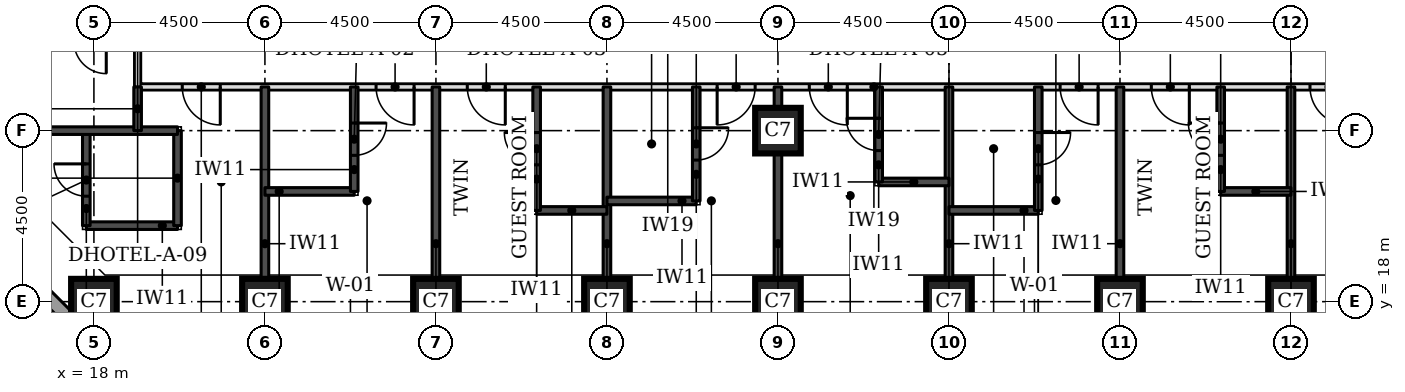
"""IFC4 building model, lengths in metres.
Left out: names, types, materials, properties, quantities, classifications, styles, units other than length and angle.
Written with IfcOpenShell. Run it as: python <this file> out.ifc"""

import sys

from ifc_helpers import new_model, si_unit, direction, frame, frame_2d, origin, origin_2d, place, context, subcontext, project, spatial, rectangle, extrude, element, fill, save


model = new_model("IFC4")
c1 = context("Model", 3, precision=1e-05, world=origin(), true_north=direction((0.0, 1.0)))
c2 = subcontext(c1, "Body", "Model", "MODEL_VIEW")
j1 = project(units=[si_unit("LENGTHUNIT", "METRE"), si_unit("PLANEANGLEUNIT", "RADIAN")], contexts=[c1])
p1 = place(None, origin())
s1 = spatial("IfcSite", under=j1, at=p1, CompositionType="ELEMENT")
p2 = place(p1, origin())
s2 = spatial("IfcBuilding", under=s1, at=p2, CompositionType="ELEMENT")
p3 = place(p2, frame((0.0, 0.0, 49.5)))
s3 = spatial("IfcBuildingStorey", under=s2, at=p3, CompositionType="ELEMENT", Elevation=49.5)
for number, where, z_axis, x_axis in (
    (1, (18.0, 18.0, 0.0), (0.0, 0.0, 1.0), (1.0, 0.0, 0.0)),
    (2, (22.5, 18.0, 0.0), (0.0, 0.0, 1.0), (1.0, 0.0, 0.0)),
    (3, (27.0, 18.0, 0.0), (0.0, 0.0, 1.0), (1.0, 0.0, 0.0)),
    (4, (31.5, 18.0, 0.0), (0.0, 0.0, 1.0), (1.0, 0.0, 0.0)),
    (5, (36.0, 18.0, 0.0), (0.0, 0.0, 1.0), (1.0, 0.0, 0.0)),
    (6, (40.5, 18.0, 0.0), (0.0, 0.0, 1.0), (1.0, 0.0, 0.0)),
    (7, (45.0, 18.0, 0.0), (0.0, 0.0, 1.0), (1.0, 0.0, 0.0)),
    (8, (49.5, 18.0, 0.0), (0.0, 0.0, 1.0), (1.0, 0.0, 0.0)),
    (9, (36.0, 22.5, 0.0), (0.0, 0.0, 1.0), (1.0, 0.0, 0.0)),
):
    element("IfcColumn", number, at=place(p3, frame(where, z_axis=z_axis, x_axis=x_axis)), inside=s3, PredefinedType="COLUMN", context=c2, shape_type="SweptSolid", body=[
        extrude(rectangle(XDim=1.2, YDim=1.2, at=origin_2d()), origin(), (0.0, 0.0, 1.0), 3.3),
    ])
p4 = place(p3, frame((12.674, 22.23, 0.0), z_axis=(0.0, 0.0, 1.0), x_axis=(0.707106781187, -0.707106781187, 0.0)))
e10 = element("IfcWall", 10, at=p4, inside=s3, PredefinedType="STANDARD", context=c2, shape_type="SweptSolid", body=[
    extrude(rectangle(XDim=7.151, YDim=0.35, at=frame_2d((3.576, 0.0))), origin(), (0.0, 0.0, 1.0), 3.055),
])
p5 = place(p4, frame((1.926, 0.0, 0.8)))
e11 = element("IfcOpeningElement", 11, at=p5, cuts=e10, PredefinedType="OPENING", context=c2, shape_type="SweptSolid", body=[
    extrude(rectangle(XDim=3.3, YDim=1.5, at=frame_2d((1.65, 0.75))), frame((0.0, 0.185, 0.0), z_axis=(0.0, -1.0, 0.0), x_axis=(1.0, 0.0, 0.0)), (0.0, 0.0, 1.0), 0.37),
])
p6 = place(p3, frame((19.15, 23.65, 0.0), z_axis=(0.0, 0.0, 1.0), x_axis=(1.0, 0.0, 0.0)))
e12 = element("IfcWall", 12, at=p6, inside=s3, PredefinedType="PARTITIONING", context=c2, shape_type="SweptSolid", body=[
    extrude(rectangle(XDim=32.35, YDim=0.15, at=frame_2d((16.175, 0.0))), origin(), (0.0, 0.0, 1.0), 3.08),
])
p7 = place(p6, frame((6.275, 0.0, 0.0)))
e13 = element("IfcOpeningElement", 13, at=p7, cuts=e12, PredefinedType="OPENING", context=c2, shape_type="SweptSolid", body=[
    extrude(rectangle(XDim=1.0, YDim=2.1, at=frame_2d((0.5, 1.05))), frame((0.0, 0.085, 0.0), z_axis=(0.0, -1.0, 0.0), x_axis=(1.0, 0.0, 0.0)), (0.0, 0.0, 1.0), 0.17),
])
p8 = place(p6, frame((8.675, 0.0, 0.0)))
e14 = element("IfcOpeningElement", 14, at=p8, cuts=e12, PredefinedType="OPENING", context=c2, shape_type="SweptSolid", body=[
    extrude(rectangle(XDim=1.0, YDim=2.1, at=frame_2d((0.5, 1.05))), frame((0.0, 0.085, 0.0), z_axis=(0.0, -1.0, 0.0), x_axis=(1.0, 0.0, 0.0)), (0.0, 0.0, 1.0), 0.17),
])
p9 = place(p6, frame((15.25, 0.0, 0.0)))
e15 = element("IfcOpeningElement", 15, at=p9, cuts=e12, PredefinedType="OPENING", context=c2, shape_type="SweptSolid", body=[
    extrude(rectangle(XDim=1.0, YDim=2.1, at=frame_2d((0.5, 1.05))), frame((0.0, 0.085, 0.0), z_axis=(0.0, -1.0, 0.0), x_axis=(1.0, 0.0, 0.0)), (0.0, 0.0, 1.0), 0.17),
])
p10 = place(p6, frame((17.675, 0.0, 0.0)))
e16 = element("IfcOpeningElement", 16, at=p10, cuts=e12, PredefinedType="OPENING", context=c2, shape_type="SweptSolid", body=[
    extrude(rectangle(XDim=1.0, YDim=2.1, at=frame_2d((0.5, 1.05))), frame((0.0, 0.085, 0.0), z_axis=(0.0, -1.0, 0.0), x_axis=(1.0, 0.0, 0.0)), (0.0, 0.0, 1.0), 0.17),
])
p11 = place(p6, frame((24.275, 0.0, 0.0)))
e17 = element("IfcOpeningElement", 17, at=p11, cuts=e12, PredefinedType="OPENING", context=c2, shape_type="SweptSolid", body=[
    extrude(rectangle(XDim=1.0, YDim=2.1, at=frame_2d((0.5, 1.05))), frame((0.0, 0.085, 0.0), z_axis=(0.0, -1.0, 0.0), x_axis=(1.0, 0.0, 0.0)), (0.0, 0.0, 1.0), 0.17),
])
p12 = place(p6, frame((26.675, 0.0, 0.0)))
e18 = element("IfcOpeningElement", 18, at=p12, cuts=e12, PredefinedType="OPENING", context=c2, shape_type="SweptSolid", body=[
    extrude(rectangle(XDim=1.0, YDim=2.1, at=frame_2d((0.5, 1.05))), frame((0.0, 0.085, 0.0), z_axis=(0.0, -1.0, 0.0), x_axis=(1.0, 0.0, 0.0)), (0.0, 0.0, 1.0), 0.17),
])
p13 = place(p6, frame((1.175, 0.0, 0.0)))
e19 = element("IfcOpeningElement", 19, at=p13, cuts=e12, PredefinedType="OPENING", context=c2, shape_type="SweptSolid", body=[
    extrude(rectangle(XDim=1.0, YDim=2.1, at=frame_2d((0.5, 1.05))), frame((0.0, 0.085, 0.0), z_axis=(0.0, -1.0, 0.0), x_axis=(1.0, 0.0, 0.0)), (0.0, 0.0, 1.0), 0.17),
])
p14 = place(p6, frame((30.85, 0.0, 0.0)))
e20 = element("IfcOpeningElement", 20, at=p14, cuts=e12, PredefinedType="OPENING", context=c2, shape_type="SweptSolid", body=[
    extrude(rectangle(XDim=1.0, YDim=2.1, at=frame_2d((0.5, 1.05))), frame((0.0, 0.085, 0.0), z_axis=(0.0, -1.0, 0.0), x_axis=(1.0, 0.0, 0.0)), (0.0, 0.0, 1.0), 0.17),
])
p15 = place(p3, frame((19.15, 23.65, 0.0), z_axis=(0.0, 0.0, 1.0), x_axis=(0.0, 1.0, 0.0)))
e21 = element("IfcWall", 21, at=p15, inside=s3, PredefinedType="PARTITIONING", context=c2, shape_type="SweptSolid", body=[
    extrude(rectangle(XDim=25.85, YDim=0.15, at=frame_2d((12.925, 0.0))), origin(), (0.0, 0.0, 1.0), 3.08),
])
p16 = place(p15, frame((1.775, 0.0, 0.0)))
e22 = element("IfcOpeningElement", 22, at=p16, cuts=e21, PredefinedType="OPENING", context=c2, shape_type="SweptSolid", body=[
    extrude(rectangle(XDim=1.0, YDim=2.1, at=frame_2d((0.5, 1.05))), frame((0.0, 0.085, 0.0), z_axis=(0.0, -1.0, 0.0), x_axis=(1.0, 0.0, 0.0)), (0.0, 0.0, 1.0), 0.17),
])
p17 = place(p15, frame((6.125, 0.0, 0.0)))
e23 = element("IfcOpeningElement", 23, at=p17, cuts=e21, PredefinedType="OPENING", context=c2, shape_type="SweptSolid", body=[
    extrude(rectangle(XDim=1.0, YDim=2.1, at=frame_2d((0.5, 1.05))), frame((0.0, 0.085, 0.0), z_axis=(0.0, -1.0, 0.0), x_axis=(1.0, 0.0, 0.0)), (0.0, 0.0, 1.0), 0.17),
])
p18 = place(p15, frame((17.825, 0.0, 0.0)))
e24 = element("IfcOpeningElement", 24, at=p18, cuts=e21, PredefinedType="OPENING", context=c2, shape_type="SweptSolid", body=[
    extrude(rectangle(XDim=1.0, YDim=2.1, at=frame_2d((0.5, 1.05))), frame((0.0, 0.085, 0.0), z_axis=(0.0, -1.0, 0.0), x_axis=(1.0, 0.0, 0.0)), (0.0, 0.0, 1.0), 0.17),
])
p19 = place(p15, frame((23.04, 0.0, 0.0)))
e25 = element("IfcOpeningElement", 25, at=p19, cuts=e21, PredefinedType="OPENING", context=c2, shape_type="SweptSolid", body=[
    extrude(rectangle(XDim=0.9, YDim=2.1, at=frame_2d((0.45, 1.05))), frame((0.0, 0.085, 0.0), z_axis=(0.0, -1.0, 0.0), x_axis=(1.0, 0.0, 0.0)), (0.0, 0.0, 1.0), 0.17),
])
for number, where, z_axis, x_axis in (
    (26, (22.5, 18.6, 0.0), (0.0, 0.0, 1.0), (0.0, 1.0, 0.0)),
    (27, (27.0, 18.6, 0.0), (0.0, 0.0, 1.0), (0.0, 1.0, 0.0)),
    (28, (31.5, 18.6, 0.0), (0.0, 0.0, 1.0), (0.0, 1.0, 0.0)),
    (29, (36.0, 18.6, 0.0), (0.0, 0.0, 1.0), (0.0, 1.0, 0.0)),
    (30, (40.5, 18.6, 0.0), (0.0, 0.0, 1.0), (0.0, 1.0, 0.0)),
    (31, (45.0, 18.6, 0.0), (0.0, 0.0, 1.0), (0.0, 1.0, 0.0)),
    (32, (49.5, 18.6, 0.0), (0.0, 0.0, 1.0), (0.0, 1.0, 0.0)),
):
    element("IfcWall", number, at=place(p3, frame(where, z_axis=z_axis, x_axis=x_axis)), inside=s3, PredefinedType="SOLIDWALL", context=c2, shape_type="SweptSolid", body=[
        extrude(rectangle(XDim=5.05, YDim=0.2, at=frame_2d((2.525, 0.0))), origin(), (0.0, 0.0, 1.0), 3.08),
    ])
p20 = place(p3, frame((17.8, 20.0, 0.0), z_axis=(0.0, 0.0, 1.0), x_axis=(1.0, 0.0, 0.0)))
e33 = element("IfcWall", 33, at=p20, inside=s3, PredefinedType="SOLIDWALL", context=c2, shape_type="SweptSolid", body=[
    extrude(rectangle(XDim=2.4, YDim=0.2, at=frame_2d((1.2, 0.0))), origin(), (0.0, 0.0, 1.0), 3.08),
])
p21 = place(p3, frame((17.8, 20.0, 0.0), z_axis=(0.0, 0.0, 1.0), x_axis=(0.0, 1.0, 0.0)))
e34 = element("IfcWall", 34, at=p21, inside=s3, PredefinedType="SOLIDWALL", context=c2, shape_type="SweptSolid", body=[
    extrude(rectangle(XDim=2.5, YDim=0.2, at=frame_2d((1.25, 0.0))), origin(), (0.0, 0.0, 1.0), 3.08),
])
p22 = place(p21, frame((0.775, 0.0, 0.0)))
e35 = element("IfcOpeningElement", 35, at=p22, cuts=e34, PredefinedType="OPENING", context=c2, shape_type="SweptSolid", body=[
    extrude(rectangle(XDim=0.85, YDim=2.1, at=frame_2d((0.425, 1.05))), frame((0.0, 0.11, 0.0), z_axis=(0.0, -1.0, 0.0), x_axis=(1.0, 0.0, 0.0)), (0.0, 0.0, 1.0), 0.22),
])
p23 = place(p3, frame((20.2, 20.0, 0.0), z_axis=(0.0, 0.0, 1.0), x_axis=(0.0, 1.0, 0.0)))
e36 = element("IfcWall", 36, at=p23, inside=s3, PredefinedType="SOLIDWALL", context=c2, shape_type="SweptSolid", body=[
    extrude(rectangle(XDim=2.5, YDim=0.2, at=frame_2d((1.25, 0.0))), origin(), (0.0, 0.0, 1.0), 3.08),
])
p24 = place(p3, frame((29.65, 20.4, 0.0), z_axis=(0.0, 0.0, 1.0), x_axis=(1.0, 0.0, 0.0)))
e37 = element("IfcWall", 37, at=p24, inside=s3, PredefinedType="SOLIDWALL", context=c2, shape_type="SweptSolid", body=[
    extrude(rectangle(XDim=1.85, YDim=0.2, at=frame_2d((0.925, 0.0))), origin(), (0.0, 0.0, 1.0), 3.08),
])
p25 = place(p3, frame((29.65, 20.4, 0.0), z_axis=(0.0, 0.0, 1.0), x_axis=(0.0, 1.0, 0.0)))
e38 = element("IfcWall", 38, at=p25, inside=s3, PredefinedType="SOLIDWALL", context=c2, shape_type="SweptSolid", body=[
    extrude(rectangle(XDim=3.25, YDim=0.2, at=frame_2d((1.625, 0.0))), origin(), (0.0, 0.0, 1.0), 3.08),
])
p26 = place(p25, frame((1.2, 0.0, 0.0)))
e39 = element("IfcOpeningElement", 39, at=p26, cuts=e38, PredefinedType="OPENING", context=c2, shape_type="SweptSolid", body=[
    extrude(rectangle(XDim=0.85, YDim=2.1, at=frame_2d((0.425, 1.05))), frame((0.0, 0.11, 0.0), z_axis=(0.0, -1.0, 0.0), x_axis=(1.0, 0.0, 0.0)), (0.0, 0.0, 1.0), 0.22),
])
p27 = place(p3, frame((40.5, 20.4, 0.0), z_axis=(0.0, 0.0, 1.0), x_axis=(1.0, 0.0, 0.0)))
e40 = element("IfcWall", 40, at=p27, inside=s3, PredefinedType="SOLIDWALL", context=c2, shape_type="SweptSolid", body=[
    extrude(rectangle(XDim=2.35, YDim=0.2, at=frame_2d((1.175, 0.0))), origin(), (0.0, 0.0, 1.0), 3.08),
])
p28 = place(p3, frame((42.85, 20.4, 0.0), z_axis=(0.0, 0.0, 1.0), x_axis=(0.0, 1.0, 0.0)))
e41 = element("IfcWall", 41, at=p28, inside=s3, PredefinedType="SOLIDWALL", context=c2, shape_type="SweptSolid", body=[
    extrude(rectangle(XDim=3.25, YDim=0.2, at=frame_2d((1.625, 0.0))), origin(), (0.0, 0.0, 1.0), 3.08),
])
p29 = place(p28, frame((1.2, 0.0, 0.0)))
e42 = element("IfcOpeningElement", 42, at=p29, cuts=e41, PredefinedType="OPENING", context=c2, shape_type="SweptSolid", body=[
    extrude(rectangle(XDim=0.85, YDim=2.1, at=frame_2d((0.425, 1.05))), frame((0.0, 0.11, 0.0), z_axis=(0.0, -1.0, 0.0), x_axis=(1.0, 0.0, 0.0)), (0.0, 0.0, 1.0), 0.22),
])
p30 = place(p3, frame((31.5, 20.65, 0.0), z_axis=(0.0, 0.0, 1.0), x_axis=(1.0, 0.0, 0.0)))
e43 = element("IfcWall", 43, at=p30, inside=s3, PredefinedType="SOLIDWALL", context=c2, shape_type="SweptSolid", body=[
    extrude(rectangle(XDim=2.35, YDim=0.2, at=frame_2d((1.175, 0.0))), origin(), (0.0, 0.0, 1.0), 3.08),
])
p31 = place(p3, frame((33.85, 20.65, 0.0), z_axis=(0.0, 0.0, 1.0), x_axis=(0.0, 1.0, 0.0)))
e44 = element("IfcWall", 44, at=p31, inside=s3, PredefinedType="SOLIDWALL", context=c2, shape_type="SweptSolid", body=[
    extrude(rectangle(XDim=3.0, YDim=0.2, at=frame_2d((1.5, 0.0))), origin(), (0.0, 0.0, 1.0), 3.08),
])
p32 = place(p31, frame((1.075, 0.0, 0.0)))
e45 = element("IfcOpeningElement", 45, at=p32, cuts=e44, PredefinedType="OPENING", context=c2, shape_type="SweptSolid", body=[
    extrude(rectangle(XDim=0.85, YDim=2.1, at=frame_2d((0.425, 1.05))), frame((0.0, 0.11, 0.0), z_axis=(0.0, -1.0, 0.0), x_axis=(1.0, 0.0, 0.0)), (0.0, 0.0, 1.0), 0.22),
])
p33 = place(p3, frame((22.5, 20.9, 0.0), z_axis=(0.0, 0.0, 1.0), x_axis=(1.0, 0.0, 0.0)))
e46 = element("IfcWall", 46, at=p33, inside=s3, PredefinedType="SOLIDWALL", context=c2, shape_type="SweptSolid", body=[
    extrude(rectangle(XDim=2.35, YDim=0.2, at=frame_2d((1.175, 0.0))), origin(), (0.0, 0.0, 1.0), 3.08),
])
p34 = place(p3, frame((24.85, 20.9, 0.0), z_axis=(0.0, 0.0, 1.0), x_axis=(0.0, 1.0, 0.0)))
e47 = element("IfcWall", 47, at=p34, inside=s3, PredefinedType="SOLIDWALL", context=c2, shape_type="SweptSolid", body=[
    extrude(rectangle(XDim=2.75, YDim=0.2, at=frame_2d((1.375, 0.0))), origin(), (0.0, 0.0, 1.0), 3.08),
])
p35 = place(p34, frame((0.95, 0.0, 0.0)))
e48 = element("IfcOpeningElement", 48, at=p35, cuts=e47, PredefinedType="OPENING", context=c2, shape_type="SweptSolid", body=[
    extrude(rectangle(XDim=0.85, YDim=2.1, at=frame_2d((0.425, 1.05))), frame((0.0, 0.11, 0.0), z_axis=(0.0, -1.0, 0.0), x_axis=(1.0, 0.0, 0.0)), (0.0, 0.0, 1.0), 0.22),
])
p36 = place(p3, frame((47.65, 20.9, 0.0), z_axis=(0.0, 0.0, 1.0), x_axis=(1.0, 0.0, 0.0)))
e49 = element("IfcWall", 49, at=p36, inside=s3, PredefinedType="SOLIDWALL", context=c2, shape_type="SweptSolid", body=[
    extrude(rectangle(XDim=1.85, YDim=0.2, at=frame_2d((0.925, 0.0))), origin(), (0.0, 0.0, 1.0), 3.08),
])
p37 = place(p3, frame((47.65, 20.9, 0.0), z_axis=(0.0, 0.0, 1.0), x_axis=(0.0, 1.0, 0.0)))
e50 = element("IfcWall", 50, at=p37, inside=s3, PredefinedType="SOLIDWALL", context=c2, shape_type="SweptSolid", body=[
    extrude(rectangle(XDim=2.75, YDim=0.2, at=frame_2d((1.375, 0.0))), origin(), (0.0, 0.0, 1.0), 3.08),
])
p38 = place(p37, frame((0.95, 0.0, 0.0)))
e51 = element("IfcOpeningElement", 51, at=p38, cuts=e50, PredefinedType="OPENING", context=c2, shape_type="SweptSolid", body=[
    extrude(rectangle(XDim=0.85, YDim=2.1, at=frame_2d((0.425, 1.05))), frame((0.0, 0.11, 0.0), z_axis=(0.0, -1.0, 0.0), x_axis=(1.0, 0.0, 0.0)), (0.0, 0.0, 1.0), 0.22),
])
p39 = place(p3, frame((38.65, 21.15, 0.0), z_axis=(0.0, 0.0, 1.0), x_axis=(1.0, 0.0, 0.0)))
e52 = element("IfcWall", 52, at=p39, inside=s3, PredefinedType="SOLIDWALL", context=c2, shape_type="SweptSolid", body=[
    extrude(rectangle(XDim=1.85, YDim=0.2, at=frame_2d((0.925, 0.0))), origin(), (0.0, 0.0, 1.0), 3.08),
])
p40 = place(p3, frame((38.65, 21.15, 0.0), z_axis=(0.0, 0.0, 1.0), x_axis=(0.0, 1.0, 0.0)))
e53 = element("IfcWall", 53, at=p40, inside=s3, PredefinedType="SOLIDWALL", context=c2, shape_type="SweptSolid", body=[
    extrude(rectangle(XDim=2.5, YDim=0.2, at=frame_2d((1.25, 0.0))), origin(), (0.0, 0.0, 1.0), 3.08),
])
p41 = place(p40, frame((0.825, 0.0, 0.0)))
e54 = element("IfcOpeningElement", 54, at=p41, cuts=e53, PredefinedType="OPENING", context=c2, shape_type="SweptSolid", body=[
    extrude(rectangle(XDim=0.85, YDim=2.1, at=frame_2d((0.425, 1.05))), frame((0.0, 0.11, 0.0), z_axis=(0.0, -1.0, 0.0), x_axis=(1.0, 0.0, 0.0)), (0.0, 0.0, 1.0), 0.22),
])
p42 = place(p3, frame((14.1, 22.5, 0.0), z_axis=(0.0, 0.0, 1.0), x_axis=(1.0, 0.0, 0.0)))
e55 = element("IfcWall", 55, at=p42, inside=s3, PredefinedType="SOLIDWALL", context=c2, shape_type="SweptSolid", body=[
    extrude(rectangle(XDim=6.1, YDim=0.2, at=frame_2d((3.05, 0.0))), origin(), (0.0, 0.0, 1.0), 3.08),
])
p43 = place(p3, frame((19.15, 22.5, 0.0), z_axis=(0.0, 0.0, 1.0), x_axis=(0.0, 1.0, 0.0)))
e56 = element("IfcWall", 56, at=p43, inside=s3, PredefinedType="SOLIDWALL", context=c2, shape_type="SweptSolid", body=[
    extrude(rectangle(XDim=1.15, YDim=0.2, at=frame_2d((0.575, 0.0))), origin(), (0.0, 0.0, 1.0), 3.08),
])
p44 = place(p7, frame((1.0, 0.0, 0.0), z_axis=(0.0, 0.0, 1.0), x_axis=(-1.0, 0.0, 0.0)))
e57 = element("IfcDoor", 57, at=p44, inside=s3, OperationType="SINGLE_SWING_LEFT", PredefinedType="DOOR", context=c2, shape_type="SweptSolid", body=[
    extrude(rectangle(XDim=1.0, YDim=2.1, at=frame_2d((0.5, 1.05))), frame((0.0, 0.025, 0.0), z_axis=(0.0, -1.0, 0.0), x_axis=(1.0, 0.0, 0.0)), (0.0, 0.0, 1.0), 0.05),
])
fill(e13, e57)
p45 = place(p35, frame((0.85, 0.0, 0.0), z_axis=(0.0, 0.0, 1.0), x_axis=(-1.0, 0.0, 0.0)))
e58 = element("IfcDoor", 58, at=p45, inside=s3, OperationType="SINGLE_SWING_LEFT", PredefinedType="DOOR", context=c2, shape_type="SweptSolid", body=[
    extrude(rectangle(XDim=0.85, YDim=2.1, at=frame_2d((0.425, 1.05))), frame((0.0, 0.025, 0.0), z_axis=(0.0, -1.0, 0.0), x_axis=(1.0, 0.0, 0.0)), (0.0, 0.0, 1.0), 0.05),
])
fill(e48, e58)
p46 = place(p8, frame((1.0, 0.0, 0.0), z_axis=(0.0, 0.0, 1.0), x_axis=(-1.0, 0.0, 0.0)))
e59 = element("IfcDoor", 59, at=p46, inside=s3, OperationType="SINGLE_SWING_LEFT", PredefinedType="DOOR", context=c2, shape_type="SweptSolid", body=[
    extrude(rectangle(XDim=1.0, YDim=2.1, at=frame_2d((0.5, 1.05))), frame((0.0, 0.025, 0.0), z_axis=(0.0, -1.0, 0.0), x_axis=(1.0, 0.0, 0.0)), (0.0, 0.0, 1.0), 0.05),
])
fill(e14, e59)
p47 = place(p26, origin())
e60 = element("IfcDoor", 60, at=p47, inside=s3, OperationType="SINGLE_SWING_RIGHT", PredefinedType="DOOR", context=c2, shape_type="SweptSolid", body=[
    extrude(rectangle(XDim=0.85, YDim=2.1, at=frame_2d((0.425, 1.05))), frame((0.0, 0.025, 0.0), z_axis=(0.0, -1.0, 0.0), x_axis=(1.0, 0.0, 0.0)), (0.0, 0.0, 1.0), 0.05),
])
fill(e39, e60)
p48 = place(p9, frame((1.0, 0.0, 0.0), z_axis=(0.0, 0.0, 1.0), x_axis=(-1.0, 0.0, 0.0)))
e61 = element("IfcDoor", 61, at=p48, inside=s3, OperationType="SINGLE_SWING_RIGHT", PredefinedType="DOOR", context=c2, shape_type="SweptSolid", body=[
    extrude(rectangle(XDim=1.0, YDim=2.1, at=frame_2d((0.5, 1.05))), frame((0.0, 0.025, 0.0), z_axis=(0.0, -1.0, 0.0), x_axis=(1.0, 0.0, 0.0)), (0.0, 0.0, 1.0), 0.05),
])
fill(e15, e61)
p49 = place(p32, frame((0.85, 0.0, 0.0), z_axis=(0.0, 0.0, 1.0), x_axis=(-1.0, 0.0, 0.0)))
e62 = element("IfcDoor", 62, at=p49, inside=s3, OperationType="SINGLE_SWING_LEFT", PredefinedType="DOOR", context=c2, shape_type="SweptSolid", body=[
    extrude(rectangle(XDim=0.85, YDim=2.1, at=frame_2d((0.425, 1.05))), frame((0.0, 0.025, 0.0), z_axis=(0.0, -1.0, 0.0), x_axis=(1.0, 0.0, 0.0)), (0.0, 0.0, 1.0), 0.05),
])
fill(e45, e62)
p50 = place(p10, frame((1.0, 0.0, 0.0), z_axis=(0.0, 0.0, 1.0), x_axis=(-1.0, 0.0, 0.0)))
e63 = element("IfcDoor", 63, at=p50, inside=s3, OperationType="SINGLE_SWING_LEFT", PredefinedType="DOOR", context=c2, shape_type="SweptSolid", body=[
    extrude(rectangle(XDim=1.0, YDim=2.1, at=frame_2d((0.5, 1.05))), frame((0.0, 0.025, 0.0), z_axis=(0.0, -1.0, 0.0), x_axis=(1.0, 0.0, 0.0)), (0.0, 0.0, 1.0), 0.05),
])
fill(e16, e63)
p51 = place(p41, origin())
e64 = element("IfcDoor", 64, at=p51, inside=s3, OperationType="SINGLE_SWING_RIGHT", PredefinedType="DOOR", context=c2, shape_type="SweptSolid", body=[
    extrude(rectangle(XDim=0.85, YDim=2.1, at=frame_2d((0.425, 1.05))), frame((0.0, 0.025, 0.0), z_axis=(0.0, -1.0, 0.0), x_axis=(1.0, 0.0, 0.0)), (0.0, 0.0, 1.0), 0.05),
])
fill(e54, e64)
p52 = place(p11, frame((1.0, 0.0, 0.0), z_axis=(0.0, 0.0, 1.0), x_axis=(-1.0, 0.0, 0.0)))
e65 = element("IfcDoor", 65, at=p52, inside=s3, OperationType="SINGLE_SWING_LEFT", PredefinedType="DOOR", context=c2, shape_type="SweptSolid", body=[
    extrude(rectangle(XDim=1.0, YDim=2.1, at=frame_2d((0.5, 1.05))), frame((0.0, 0.025, 0.0), z_axis=(0.0, -1.0, 0.0), x_axis=(1.0, 0.0, 0.0)), (0.0, 0.0, 1.0), 0.05),
])
fill(e17, e65)
p53 = place(p29, frame((0.85, 0.0, 0.0), z_axis=(0.0, 0.0, 1.0), x_axis=(-1.0, 0.0, 0.0)))
e66 = element("IfcDoor", 66, at=p53, inside=s3, OperationType="SINGLE_SWING_LEFT", PredefinedType="DOOR", context=c2, shape_type="SweptSolid", body=[
    extrude(rectangle(XDim=0.85, YDim=2.1, at=frame_2d((0.425, 1.05))), frame((0.0, 0.025, 0.0), z_axis=(0.0, -1.0, 0.0), x_axis=(1.0, 0.0, 0.0)), (0.0, 0.0, 1.0), 0.05),
])
fill(e42, e66)
p54 = place(p12, frame((1.0, 0.0, 0.0), z_axis=(0.0, 0.0, 1.0), x_axis=(-1.0, 0.0, 0.0)))
e67 = element("IfcDoor", 67, at=p54, inside=s3, OperationType="SINGLE_SWING_LEFT", PredefinedType="DOOR", context=c2, shape_type="SweptSolid", body=[
    extrude(rectangle(XDim=1.0, YDim=2.1, at=frame_2d((0.5, 1.05))), frame((0.0, 0.025, 0.0), z_axis=(0.0, -1.0, 0.0), x_axis=(1.0, 0.0, 0.0)), (0.0, 0.0, 1.0), 0.05),
])
fill(e18, e67)
p55 = place(p38, origin())
e68 = element("IfcDoor", 68, at=p55, inside=s3, OperationType="SINGLE_SWING_RIGHT", PredefinedType="DOOR", context=c2, shape_type="SweptSolid", body=[
    extrude(rectangle(XDim=0.85, YDim=2.1, at=frame_2d((0.425, 1.05))), frame((0.0, 0.025, 0.0), z_axis=(0.0, -1.0, 0.0), x_axis=(1.0, 0.0, 0.0)), (0.0, 0.0, 1.0), 0.05),
])
fill(e51, e68)
p56 = place(p13, frame((1.0, 0.0, 0.0), z_axis=(0.0, 0.0, 1.0), x_axis=(-1.0, 0.0, 0.0)))
e69 = element("IfcDoor", 69, at=p56, inside=s3, OperationType="SINGLE_SWING_LEFT", PredefinedType="DOOR", context=c2, shape_type="SweptSolid", body=[
    extrude(rectangle(XDim=1.0, YDim=2.1, at=frame_2d((0.5, 1.05))), frame((0.0, 0.025, 0.0), z_axis=(0.0, -1.0, 0.0), x_axis=(1.0, 0.0, 0.0)), (0.0, 0.0, 1.0), 0.05),
])
fill(e19, e69)
p57 = place(p22, origin())
e70 = element("IfcDoor", 70, at=p57, inside=s3, OperationType="SINGLE_SWING_RIGHT", PredefinedType="DOOR", context=c2, shape_type="SweptSolid", body=[
    extrude(rectangle(XDim=0.85, YDim=2.1, at=frame_2d((0.425, 1.05))), frame((0.0, 0.025, 0.0), z_axis=(0.0, -1.0, 0.0), x_axis=(1.0, 0.0, 0.0)), (0.0, 0.0, 1.0), 0.05),
])
fill(e35, e70)
p58 = place(p14, frame((1.0, 0.0, 0.0), z_axis=(0.0, 0.0, 1.0), x_axis=(-1.0, 0.0, 0.0)))
e71 = element("IfcDoor", 71, at=p58, inside=s3, OperationType="SINGLE_SWING_LEFT", PredefinedType="DOOR", context=c2, shape_type="SweptSolid", body=[
    extrude(rectangle(XDim=1.0, YDim=2.1, at=frame_2d((0.5, 1.05))), frame((0.0, 0.025, 0.0), z_axis=(0.0, -1.0, 0.0), x_axis=(1.0, 0.0, 0.0)), (0.0, 0.0, 1.0), 0.05),
])
fill(e20, e71)
save(model, sys.argv[1])
